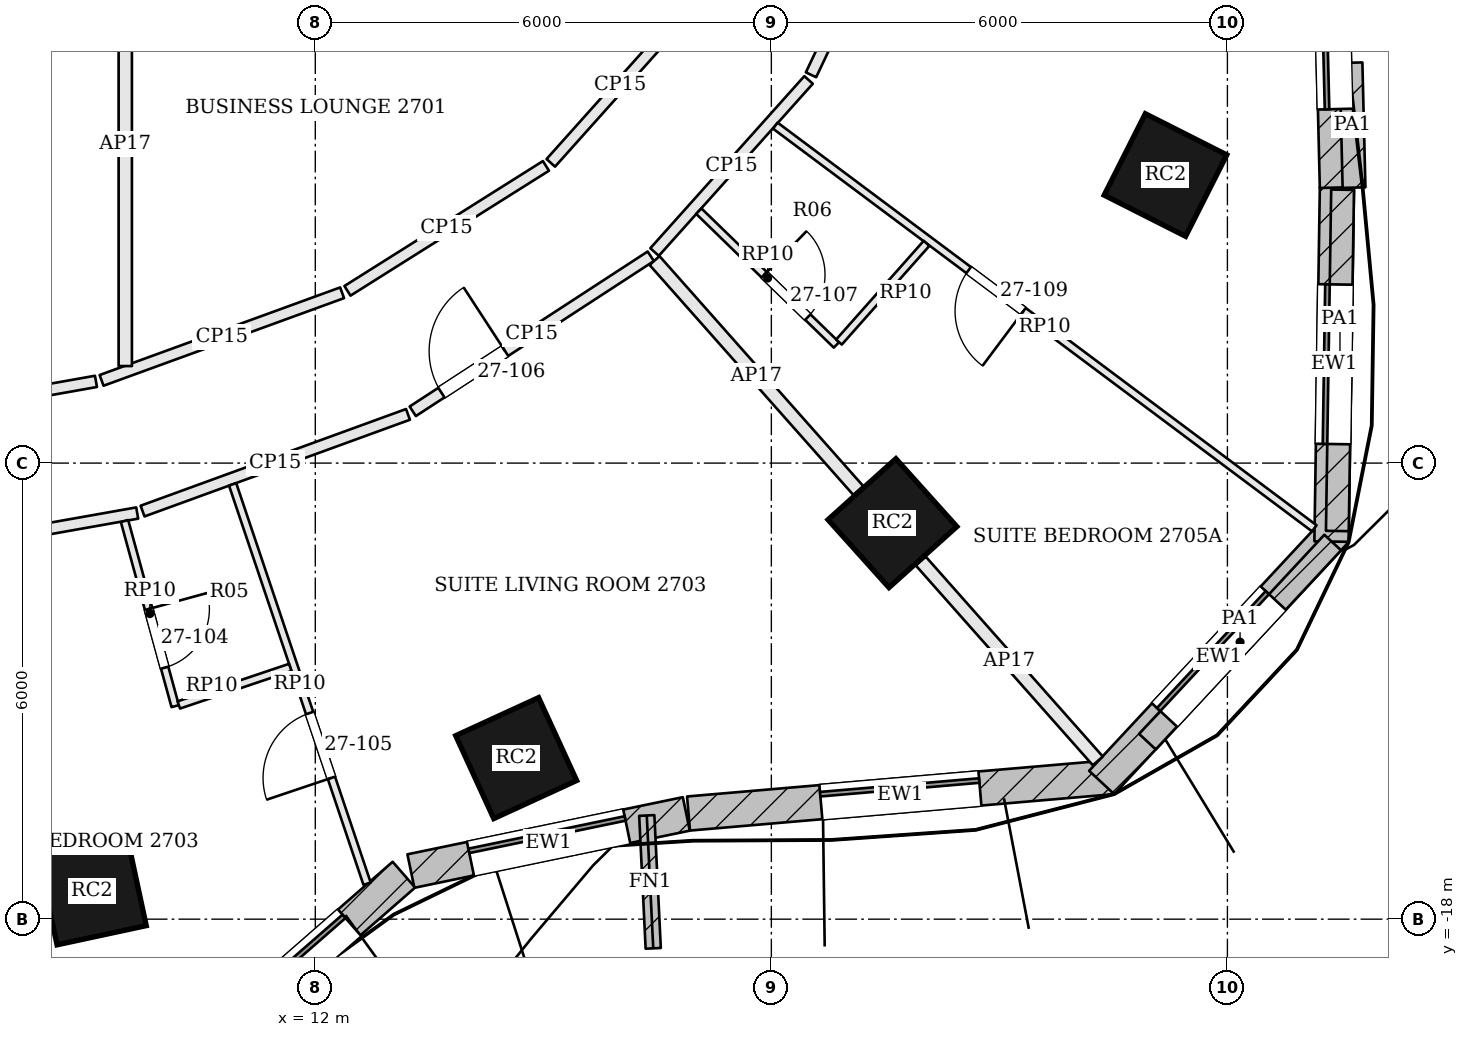
"""IFC4 building model, lengths in metres.
Left out: names, types, materials, properties, quantities, classifications, styles, units other than length and angle.
Written with IfcOpenShell. Run it as: python <this file> out.ifc"""

import sys

from ifc_helpers import new_model, si_unit, direction, frame, frame_2d, origin, origin_2d, place, context, subcontext, project, spatial, rectangle, extrude, element, fill, save


model = new_model("IFC4")
c1 = context("Model", 3, precision=1e-05, world=origin(), true_north=direction((0.0, 1.0)))
c2 = subcontext(c1, "Body", "Model", "MODEL_VIEW")
j1 = project(units=[si_unit("LENGTHUNIT", "METRE"), si_unit("PLANEANGLEUNIT", "RADIAN")], contexts=[c1])
p1 = place(None, origin())
s1 = spatial("IfcSite", under=j1, at=p1, CompositionType="ELEMENT")
p2 = place(p1, origin())
s2 = spatial("IfcBuilding", under=s1, at=p2, CompositionType="ELEMENT")
p3 = place(p2, frame((0.0, 0.0, 114.0)))
s3 = spatial("IfcBuildingStorey", under=s2, at=p3, CompositionType="ELEMENT", Elevation=114.0)
for number, where, z_axis, x_axis in (
    (1, (9.063, -17.625, 0.0), (0.0, 0.0, 1.0), (0.978, 0.21, 0.0)),
    (2, (14.643, -15.881, 0.0), (0.0, 0.0, 1.0), (0.909, 0.417, 0.0)),
    (3, (19.593, -12.79, 0.0), (0.0, 0.0, 1.0), (0.744, 0.668, 0.0)),
    (4, (23.185, -8.21, 0.0), (0.0, 0.0, 1.0), (0.451, 0.893, 0.0)),
):
    element("IfcColumn", number, at=place(p3, frame(where, z_axis=z_axis, x_axis=x_axis)), inside=s3, PredefinedType="COLUMN", context=c2, shape_type="SweptSolid", body=[
        extrude(rectangle(XDim=1.2, YDim=1.2, at=origin_2d()), origin(), (0.0, 0.0, 1.0), 3.6),
    ])
p4 = place(p3, frame((10.146, -20.051, 0.0), z_axis=(0.0, 0.0, 1.0), x_axis=(0.753278140428, 0.657702093013, 0.0)))
e5 = element("IfcWall", 5, at=p4, inside=s3, PredefinedType="SOLIDWALL", context=c2, shape_type="SweptSolid", body=[
    extrude(rectangle(XDim=4.008, YDim=0.45, at=frame_2d((2.004, 0.0))), origin(), (0.0, 0.0, 1.0), 3.4),
])
p5 = place(p4, frame((0.954, 0.0, 0.9)))
e6 = element("IfcOpeningElement", 6, at=p5, cuts=e5, PredefinedType="OPENING", context=c2, shape_type="SweptSolid", body=[
    extrude(rectangle(XDim=2.1, YDim=2.0, at=frame_2d((1.05, 1.0))), frame((0.0, 0.235, 0.0), z_axis=(0.0, -1.0, 0.0), x_axis=(1.0, 0.0, 0.0)), (0.0, 0.0, 1.0), 0.47),
])
p6 = place(p3, frame((13.258, -17.367, 0.0), z_axis=(0.0, 0.0, 1.0), x_axis=(0.97914968674, 0.203140077183, 0.0)))
e7 = element("IfcWall", 7, at=p6, inside=s3, PredefinedType="SOLIDWALL", context=c2, shape_type="SweptSolid", body=[
    extrude(rectangle(XDim=3.7, YDim=0.45, at=frame_2d((1.85, 0.0))), origin(), (0.0, 0.0, 1.0), 3.4),
])
p7 = place(p6, frame((0.8, 0.0, 0.9)))
e8 = element("IfcOpeningElement", 8, at=p7, cuts=e7, PredefinedType="OPENING", context=c2, shape_type="SweptSolid", body=[
    extrude(rectangle(XDim=2.1, YDim=2.0, at=frame_2d((1.05, 1.0))), frame((0.0, 0.235, 0.0), z_axis=(0.0, -1.0, 0.0), x_axis=(1.0, 0.0, 0.0)), (0.0, 0.0, 1.0), 0.47),
])
p8 = place(p3, frame((16.91, -16.61, 0.0), z_axis=(0.0, 0.0, 1.0), x_axis=(0.996333165816, 0.085558299972, 0.0)))
e9 = element("IfcWall", 9, at=p8, inside=s3, PredefinedType="SOLIDWALL", context=c2, shape_type="SweptSolid", body=[
    extrude(rectangle(XDim=5.596, YDim=0.45, at=frame_2d((2.798, 0.0))), origin(), (0.0, 0.0, 1.0), 3.4),
])
p9 = place(p8, frame((1.748, 0.0, 0.9)))
e10 = element("IfcOpeningElement", 10, at=p9, cuts=e9, PredefinedType="OPENING", context=c2, shape_type="SweptSolid", body=[
    extrude(rectangle(XDim=2.1, YDim=2.0, at=frame_2d((1.05, 1.0))), frame((0.0, 0.235, 0.0), z_axis=(0.0, -1.0, 0.0), x_axis=(1.0, 0.0, 0.0)), (0.0, 0.0, 1.0), 0.47),
])
p10 = place(p3, frame((22.345, -16.202, 0.0), z_axis=(0.0, 0.0, 1.0), x_axis=(0.681249161265, 0.732051624051, 0.0)))
e11 = element("IfcWall", 11, at=p10, inside=s3, PredefinedType="SOLIDWALL", context=c2, shape_type="SweptSolid", body=[
    extrude(rectangle(XDim=4.527, YDim=0.45, at=frame_2d((2.263, 0.0))), origin(), (0.0, 0.0, 1.0), 3.4),
])
p11 = place(p10, frame((1.213, 0.0, 0.9)))
e12 = element("IfcOpeningElement", 12, at=p11, cuts=e11, PredefinedType="OPENING", context=c2, shape_type="SweptSolid", body=[
    extrude(rectangle(XDim=2.1, YDim=2.0, at=frame_2d((1.05, 1.0))), frame((0.0, 0.235, 0.0), z_axis=(0.0, -1.0, 0.0), x_axis=(1.0, 0.0, 0.0)), (0.0, 0.0, 1.0), 0.47),
])
p12 = place(p3, frame((25.369, -13.032, 0.0), z_axis=(0.0, 0.0, 1.0), x_axis=(0.015383599855, 0.999881665426, 0.0)))
e13 = element("IfcWall", 13, at=p12, inside=s3, PredefinedType="SOLIDWALL", context=c2, shape_type="SweptSolid", body=[
    extrude(rectangle(XDim=4.666, YDim=0.45, at=frame_2d((2.333, 0.0))), origin(), (0.0, 0.0, 1.0), 3.4),
])
p13 = place(p12, frame((1.283, 0.0, 0.9)))
e14 = element("IfcOpeningElement", 14, at=p13, cuts=e13, PredefinedType="OPENING", context=c2, shape_type="SweptSolid", body=[
    extrude(rectangle(XDim=2.1, YDim=2.0, at=frame_2d((1.05, 1.0))), frame((0.0, 0.235, 0.0), z_axis=(0.0, -1.0, 0.0), x_axis=(1.0, 0.0, 0.0)), (0.0, 0.0, 1.0), 0.47),
])
p14 = place(p3, frame((25.441, -8.375, 0.0), z_axis=(0.0, 0.0, 1.0), x_axis=(-0.024385850259, 0.999702620936, 0.0)))
e15 = element("IfcWall", 15, at=p14, inside=s3, PredefinedType="SOLIDWALL", context=c2, shape_type="SweptSolid", body=[
    extrude(rectangle(XDim=4.165, YDim=0.45, at=frame_2d((2.083, 0.0))), origin(), (0.0, 0.0, 1.0), 3.4),
])
p15 = place(p14, frame((1.032, 0.0, 0.9)))
e16 = element("IfcOpeningElement", 16, at=p15, cuts=e15, PredefinedType="OPENING", context=c2, shape_type="SweptSolid", body=[
    extrude(rectangle(XDim=2.1, YDim=2.0, at=frame_2d((1.05, 1.0))), frame((0.0, 0.235, 0.0), z_axis=(0.0, -1.0, 0.0), x_axis=(1.0, 0.0, 0.0)), (0.0, 0.0, 1.0), 0.47),
])
p16 = place(p3, frame((16.361, -16.636, 0.0), z_axis=(0.0, 0.0, 1.0), x_axis=(0.048552811097, -0.998820616795, 0.0)))
e17 = element("IfcWall", 17, at=p16, inside=s3, PredefinedType="SOLIDWALL", context=c2, shape_type="SweptSolid", body=[
    extrude(rectangle(XDim=1.75, YDim=0.2, at=frame_2d((0.875, 0.0))), origin(), (0.0, 0.0, 1.0), 3.4),
])
p17 = place(p3, frame((22.948, -15.665, 3.6), z_axis=(0.0, 0.0, 1.0), x_axis=(0.681269800001, 0.732032417046, 0.0)))
e18 = element("IfcWall", 18, at=p17, inside=s3, PredefinedType="PARAPET", context=c2, shape_type="SweptSolid", body=[
    extrude(rectangle(XDim=3.578, YDim=0.3, at=frame_2d((1.789, 0.0))), origin(), (0.0, 0.0, 1.0), 1.1),
])
p18 = place(p3, frame((25.446, -12.893, 3.6), z_axis=(0.0, 0.0, 1.0), x_axis=(0.015386139974, 0.999881626342, 0.0)))
e19 = element("IfcWall", 19, at=p18, inside=s3, PredefinedType="PARAPET", context=c2, shape_type="SweptSolid", body=[
    extrude(rectangle(XDim=4.49, YDim=0.3, at=frame_2d((2.245, 0.0))), origin(), (0.0, 0.0, 1.0), 1.1),
])
p19 = place(p3, frame((25.666, -8.376, 3.6), z_axis=(0.0, 0.0, 1.0), x_axis=(-0.024357650064, 0.999703308429, 0.0)))
e20 = element("IfcWall", 20, at=p19, inside=s3, PredefinedType="PARAPET", context=c2, shape_type="SweptSolid", body=[
    extrude(rectangle(XDim=1.644, YDim=0.3, at=frame_2d((0.822, 0.0))), origin(), (0.0, 0.0, 1.0), 1.1),
])
p20 = place(p3, frame((6.057, -13.295, 0.0), z_axis=(0.0, 0.0, 1.0), x_axis=(0.984639377301, 0.174600391377, 0.0)))
e21 = element("IfcWall", 21, at=p20, inside=s3, PredefinedType="PARTITIONING", context=c2, shape_type="SweptSolid", body=[
    extrude(rectangle(XDim=3.656, YDim=0.15, at=frame_2d((1.828, 0.0))), origin(), (0.0, 0.0, 1.0), 2.784),
])
p21 = place(p3, frame((9.728, -12.631, 0.0), z_axis=(0.0, 0.0, 1.0), x_axis=(0.939626438181, 0.342201923826, 0.0)))
e22 = element("IfcWall", 22, at=p21, inside=s3, PredefinedType="PARTITIONING", context=c2, shape_type="SweptSolid", body=[
    extrude(rectangle(XDim=3.716, YDim=0.15, at=frame_2d((1.858, 0.0))), origin(), (0.0, 0.0, 1.0), 2.784),
])
p22 = place(p3, frame((13.282, -11.318, 0.0), z_axis=(0.0, 0.0, 1.0), x_axis=(0.837992526312, 0.54568170745, 0.0)))
e23 = element("IfcWall", 23, at=p22, inside=s3, PredefinedType="PARTITIONING", context=c2, shape_type="SweptSolid", body=[
    extrude(rectangle(XDim=3.737, YDim=0.15, at=frame_2d((1.868, 0.0))), origin(), (0.0, 0.0, 1.0), 2.784),
])
p23 = place(p22, frame((0.45, 0.0, 0.0)))
e24 = element("IfcOpeningElement", 24, at=p23, cuts=e23, PredefinedType="OPENING", context=c2, shape_type="SweptSolid", body=[
    extrude(rectangle(XDim=1.0, YDim=2.1, at=frame_2d((0.5, 1.05))), frame((0.0, 0.085, 0.0), z_axis=(0.0, -1.0, 0.0), x_axis=(1.0, 0.0, 0.0)), (0.0, 0.0, 1.0), 0.17),
])
p24 = place(p3, frame((22.295, -15.918, 0.0), z_axis=(0.0, 0.0, 1.0), x_axis=(-0.663107572679, 0.748524112541, 0.0)))
e25 = element("IfcWall", 25, at=p24, inside=s3, PredefinedType="PARTITIONING", context=c2, shape_type="SweptSolid", body=[
    extrude(rectangle(XDim=3.513, YDim=0.175, at=frame_2d((1.756, 0.0))), origin(), (0.0, 0.0, 1.0), 2.784),
])
p25 = place(p3, frame((19.143, -12.36, 0.0), z_axis=(0.0, 0.0, 1.0), x_axis=(-0.663106815301, 0.748524783492, 0.0)))
e26 = element("IfcWall", 26, at=p25, inside=s3, PredefinedType="PARTITIONING", context=c2, shape_type="SweptSolid", body=[
    extrude(rectangle(XDim=4.042, YDim=0.175, at=frame_2d((2.021, 0.0))), origin(), (0.0, 0.0, 1.0), 2.784),
])
p26 = place(p3, frame((16.464, -9.223, 0.0), z_axis=(0.0, 0.0, 1.0), x_axis=(0.666804255031, 0.745232906864, 0.0)))
e27 = element("IfcWall", 27, at=p26, inside=s3, PredefinedType="PARTITIONING", context=c2, shape_type="SweptSolid", body=[
    extrude(rectangle(XDim=3.038, YDim=0.15, at=frame_2d((1.519, 0.0))), origin(), (0.0, 0.0, 1.0), 2.784),
])
p27 = place(p3, frame((18.522, -6.891, 0.0), z_axis=(0.0, 0.0, 1.0), x_axis=(0.428157819028, 0.903703979191, 0.0)))
e28 = element("IfcWall", 28, at=p27, inside=s3, PredefinedType="PARTITIONING", context=c2, shape_type="SweptSolid", body=[
    extrude(rectangle(XDim=2.349, YDim=0.15, at=frame_2d((1.175, 0.0))), origin(), (0.0, 0.0, 1.0), 2.784),
])
p28 = place(p3, frame((16.925, -6.009, 0.0), z_axis=(0.0, 0.0, 1.0), x_axis=(-0.666893859891, -0.745152722359, 0.0)))
e29 = element("IfcWall", 29, at=p28, inside=s3, PredefinedType="PARTITIONING", context=c2, shape_type="SweptSolid", body=[
    extrude(rectangle(XDim=2.739, YDim=0.15, at=frame_2d((1.37, 0.0))), origin(), (0.0, 0.0, 1.0), 2.784),
])
p29 = place(p3, frame((15.034, -8.09, 0.0), z_axis=(0.0, 0.0, 1.0), x_axis=(-0.846322679414, -0.532670557014, 0.0)))
e30 = element("IfcWall", 30, at=p29, inside=s3, PredefinedType="PARTITIONING", context=c2, shape_type="SweptSolid", body=[
    extrude(rectangle(XDim=3.085, YDim=0.15, at=frame_2d((1.543, 0.0))), origin(), (0.0, 0.0, 1.0), 2.784),
])
p30 = place(p3, frame((12.353, -9.76, 0.0), z_axis=(0.0, 0.0, 1.0), x_axis=(-0.939632450309, -0.342185415127, 0.0)))
e31 = element("IfcWall", 31, at=p30, inside=s3, PredefinedType="PARTITIONING", context=c2, shape_type="SweptSolid", body=[
    extrude(rectangle(XDim=3.368, YDim=0.15, at=frame_2d((1.684, 0.0))), origin(), (0.0, 0.0, 1.0), 2.784),
])
p31 = place(p3, frame((9.115, -10.925, 0.0), z_axis=(0.0, 0.0, 1.0), x_axis=(-0.984632605417, -0.174638576352, 0.0)))
e32 = element("IfcWall", 32, at=p31, inside=s3, PredefinedType="PARTITIONING", context=c2, shape_type="SweptSolid", body=[
    extrude(rectangle(XDim=4.423, YDim=0.15, at=frame_2d((2.211, 0.0))), origin(), (0.0, 0.0, 1.0), 2.784),
])
p32 = place(p3, frame((12.681, -17.533, 0.0), z_axis=(0.0, 0.0, 1.0), x_axis=(-0.319066902685, 0.947732194035, 0.0)))
e33 = element("IfcWall", 33, at=p32, inside=s3, PredefinedType="PARTITIONING", context=c2, shape_type="SweptSolid", body=[
    extrude(rectangle(XDim=5.544, YDim=0.1, at=frame_2d((2.772, 0.0))), origin(), (0.0, 0.0, 1.0), 2.884),
])
p33 = place(p32, frame((1.469, 0.0, 0.0)))
e34 = element("IfcOpeningElement", 34, at=p33, cuts=e33, PredefinedType="OPENING", context=c2, shape_type="SweptSolid", body=[
    extrude(rectangle(XDim=0.9, YDim=2.4, at=frame_2d((0.45, 1.2))), frame((0.0, 0.06, 0.0), z_axis=(0.0, -1.0, 0.0), x_axis=(1.0, 0.0, 0.0)), (0.0, 0.0, 1.0), 0.12),
])
p34 = place(p3, frame((9.49, -12.762, 0.0), z_axis=(0.0, 0.0, 1.0), x_axis=(0.264041724806, -0.96451125839, 0.0)))
e35 = element("IfcWall", 35, at=p34, inside=s3, PredefinedType="PARTITIONING", context=c2, shape_type="SweptSolid", body=[
    extrude(rectangle(XDim=2.525, YDim=0.1, at=frame_2d((1.263, 0.0))), origin(), (0.0, 0.0, 1.0), 2.884),
])
p35 = place(p34, frame((1.2, 0.0, 0.0)))
e36 = element("IfcOpeningElement", 36, at=p35, cuts=e35, PredefinedType="OPENING", context=c2, shape_type="SweptSolid", body=[
    extrude(rectangle(XDim=0.8, YDim=2.1, at=frame_2d((0.4, 1.05))), frame((0.0, 0.06, 0.0), z_axis=(0.0, -1.0, 0.0), x_axis=(1.0, 0.0, 0.0)), (0.0, 0.0, 1.0), 0.12),
])
p36 = place(p3, frame((10.204, -15.182, 0.0), z_axis=(0.0, 0.0, 1.0), x_axis=(0.947779968737, 0.318924961175, 0.0)))
e37 = element("IfcWall", 37, at=p36, inside=s3, PredefinedType="PARTITIONING", context=c2, shape_type="SweptSolid", body=[
    extrude(rectangle(XDim=1.547, YDim=0.1, at=frame_2d((0.773, 0.0))), origin(), (0.0, 0.0, 1.0), 2.884),
])
p37 = place(p3, frame((25.143, -12.858, 0.0), z_axis=(0.0, 0.0, 1.0), x_axis=(-0.801110758558, 0.598516125532, 0.0)))
e38 = element("IfcWall", 38, at=p37, inside=s3, PredefinedType="PARTITIONING", context=c2, shape_type="SweptSolid", body=[
    extrude(rectangle(XDim=8.851, YDim=0.1, at=frame_2d((4.426, 0.0))), origin(), (0.0, 0.0, 1.0), 2.884),
])
p38 = place(p37, frame((4.776, 0.0, 0.0)))
e39 = element("IfcOpeningElement", 39, at=p38, cuts=e38, PredefinedType="OPENING", context=c2, shape_type="SweptSolid", body=[
    extrude(rectangle(XDim=0.9, YDim=2.4, at=frame_2d((0.45, 1.2))), frame((0.0, 0.06, 0.0), z_axis=(0.0, -1.0, 0.0), x_axis=(1.0, 0.0, 0.0)), (0.0, 0.0, 1.0), 0.12),
])
p39 = place(p3, frame((17.045, -8.686, 0.0), z_axis=(0.0, 0.0, 1.0), x_axis=(0.717138536437, -0.696930641855, 0.0)))
e40 = element("IfcWall", 40, at=p39, inside=s3, PredefinedType="PARTITIONING", context=c2, shape_type="SweptSolid", body=[
    extrude(rectangle(XDim=2.525, YDim=0.1, at=frame_2d((1.262, 0.0))), origin(), (0.0, 0.0, 1.0), 2.884),
])
p40 = place(p39, frame((1.2, 0.0, 0.0)))
e41 = element("IfcOpeningElement", 41, at=p40, cuts=e40, PredefinedType="OPENING", context=c2, shape_type="SweptSolid", body=[
    extrude(rectangle(XDim=0.8, YDim=2.1, at=frame_2d((0.4, 1.05))), frame((0.0, 0.06, 0.0), z_axis=(0.0, -1.0, 0.0), x_axis=(1.0, 0.0, 0.0)), (0.0, 0.0, 1.0), 0.12),
])
p41 = place(p3, frame((18.889, -10.408, 0.0), z_axis=(0.0, 0.0, 1.0), x_axis=(0.663586674681, 0.748099408625, 0.0)))
e42 = element("IfcWall", 42, at=p41, inside=s3, PredefinedType="PARTITIONING", context=c2, shape_type="SweptSolid", body=[
    extrude(rectangle(XDim=1.736, YDim=0.1, at=frame_2d((0.868, 0.0))), origin(), (0.0, 0.0, 1.0), 2.884),
])
p42 = place(p3, frame((9.5, -10.723, 0.0), z_axis=(0.0, 0.0, 1.0), x_axis=(0.0, 1.0, 0.0)))
e43 = element("IfcWall", 43, at=p42, inside=s3, PredefinedType="PARTITIONING", context=c2, shape_type="SweptSolid", body=[
    extrude(rectangle(XDim=5.848, YDim=0.175, at=frame_2d((2.924, 0.0))), origin(), (0.0, 0.0, 1.0), 2.784),
])
p43 = place(p5, origin())
e44 = element("IfcWindow", 44, at=p43, inside=s3, PartitioningType="SINGLE_PANEL", PredefinedType="WINDOW", context=c2, shape_type="SweptSolid", body=[
    extrude(rectangle(XDim=2.1, YDim=2.0, at=frame_2d((1.05, 1.0))), frame((0.0, 0.135, 0.0), z_axis=(0.0, -1.0, 0.0), x_axis=(1.0, 0.0, 0.0)), (0.0, 0.0, 1.0), 0.06),
])
fill(e6, e44)
p44 = place(p7, origin())
e45 = element("IfcWindow", 45, at=p44, inside=s3, PartitioningType="SINGLE_PANEL", PredefinedType="WINDOW", context=c2, shape_type="SweptSolid", body=[
    extrude(rectangle(XDim=2.1, YDim=2.0, at=frame_2d((1.05, 1.0))), frame((0.0, 0.135, 0.0), z_axis=(0.0, -1.0, 0.0), x_axis=(1.0, 0.0, 0.0)), (0.0, 0.0, 1.0), 0.06),
])
fill(e8, e45)
p45 = place(p9, origin())
e46 = element("IfcWindow", 46, at=p45, inside=s3, PartitioningType="SINGLE_PANEL", PredefinedType="WINDOW", context=c2, shape_type="SweptSolid", body=[
    extrude(rectangle(XDim=2.1, YDim=2.0, at=frame_2d((1.05, 1.0))), frame((0.0, 0.135, 0.0), z_axis=(0.0, -1.0, 0.0), x_axis=(1.0, 0.0, 0.0)), (0.0, 0.0, 1.0), 0.06),
])
fill(e10, e46)
p46 = place(p11, origin())
e47 = element("IfcWindow", 47, at=p46, inside=s3, PartitioningType="SINGLE_PANEL", PredefinedType="WINDOW", context=c2, shape_type="SweptSolid", body=[
    extrude(rectangle(XDim=2.1, YDim=2.0, at=frame_2d((1.05, 1.0))), frame((0.0, 0.135, 0.0), z_axis=(0.0, -1.0, 0.0), x_axis=(1.0, 0.0, 0.0)), (0.0, 0.0, 1.0), 0.06),
])
fill(e12, e47)
p47 = place(p13, origin())
e48 = element("IfcWindow", 48, at=p47, inside=s3, PartitioningType="SINGLE_PANEL", PredefinedType="WINDOW", context=c2, shape_type="SweptSolid", body=[
    extrude(rectangle(XDim=2.1, YDim=2.0, at=frame_2d((1.05, 1.0))), frame((0.0, 0.135, 0.0), z_axis=(0.0, -1.0, 0.0), x_axis=(1.0, 0.0, 0.0)), (0.0, 0.0, 1.0), 0.06),
])
fill(e14, e48)
p48 = place(p15, origin())
e49 = element("IfcWindow", 49, at=p48, inside=s3, PartitioningType="SINGLE_PANEL", PredefinedType="WINDOW", context=c2, shape_type="SweptSolid", body=[
    extrude(rectangle(XDim=2.1, YDim=2.0, at=frame_2d((1.05, 1.0))), frame((0.0, 0.135, 0.0), z_axis=(0.0, -1.0, 0.0), x_axis=(1.0, 0.0, 0.0)), (0.0, 0.0, 1.0), 0.06),
])
fill(e16, e49)
p49 = place(p35, origin())
e50 = element("IfcDoor", 50, at=p49, inside=s3, OperationType="SINGLE_SWING_LEFT", PredefinedType="DOOR", context=c2, shape_type="SweptSolid", body=[
    extrude(rectangle(XDim=0.8, YDim=2.1, at=frame_2d((0.4, 1.05))), frame((0.0, 0.025, 0.0), z_axis=(0.0, -1.0, 0.0), x_axis=(1.0, 0.0, 0.0)), (0.0, 0.0, 1.0), 0.05),
])
fill(e36, e50)
p50 = place(p33, origin())
e51 = element("IfcDoor", 51, at=p50, inside=s3, OperationType="SINGLE_SWING_LEFT", PredefinedType="DOOR", context=c2, shape_type="SweptSolid", body=[
    extrude(rectangle(XDim=0.9, YDim=2.4, at=frame_2d((0.45, 1.2))), frame((0.0, 0.025, 0.0), z_axis=(0.0, -1.0, 0.0), x_axis=(1.0, 0.0, 0.0)), (0.0, 0.0, 1.0), 0.05),
])
fill(e34, e51)
p51 = place(p23, origin())
e52 = element("IfcDoor", 52, at=p51, inside=s3, OperationType="SINGLE_SWING_RIGHT", PredefinedType="DOOR", context=c2, shape_type="SweptSolid", body=[
    extrude(rectangle(XDim=1.0, YDim=2.1, at=frame_2d((0.5, 1.05))), frame((0.0, 0.025, 0.0), z_axis=(0.0, -1.0, 0.0), x_axis=(1.0, 0.0, 0.0)), (0.0, 0.0, 1.0), 0.05),
])
fill(e24, e52)
p52 = place(p40, origin())
e53 = element("IfcDoor", 53, at=p52, inside=s3, OperationType="SINGLE_SWING_LEFT", PredefinedType="DOOR", context=c2, shape_type="SweptSolid", body=[
    extrude(rectangle(XDim=0.8, YDim=2.1, at=frame_2d((0.4, 1.05))), frame((0.0, 0.025, 0.0), z_axis=(0.0, -1.0, 0.0), x_axis=(1.0, 0.0, 0.0)), (0.0, 0.0, 1.0), 0.05),
])
fill(e41, e53)
p53 = place(p38, origin())
e54 = element("IfcDoor", 54, at=p53, inside=s3, OperationType="SINGLE_SWING_LEFT", PredefinedType="DOOR", context=c2, shape_type="SweptSolid", body=[
    extrude(rectangle(XDim=0.9, YDim=2.4, at=frame_2d((0.45, 1.2))), frame((0.0, 0.025, 0.0), z_axis=(0.0, -1.0, 0.0), x_axis=(1.0, 0.0, 0.0)), (0.0, 0.0, 1.0), 0.05),
])
fill(e39, e54)
save(model, sys.argv[1])
